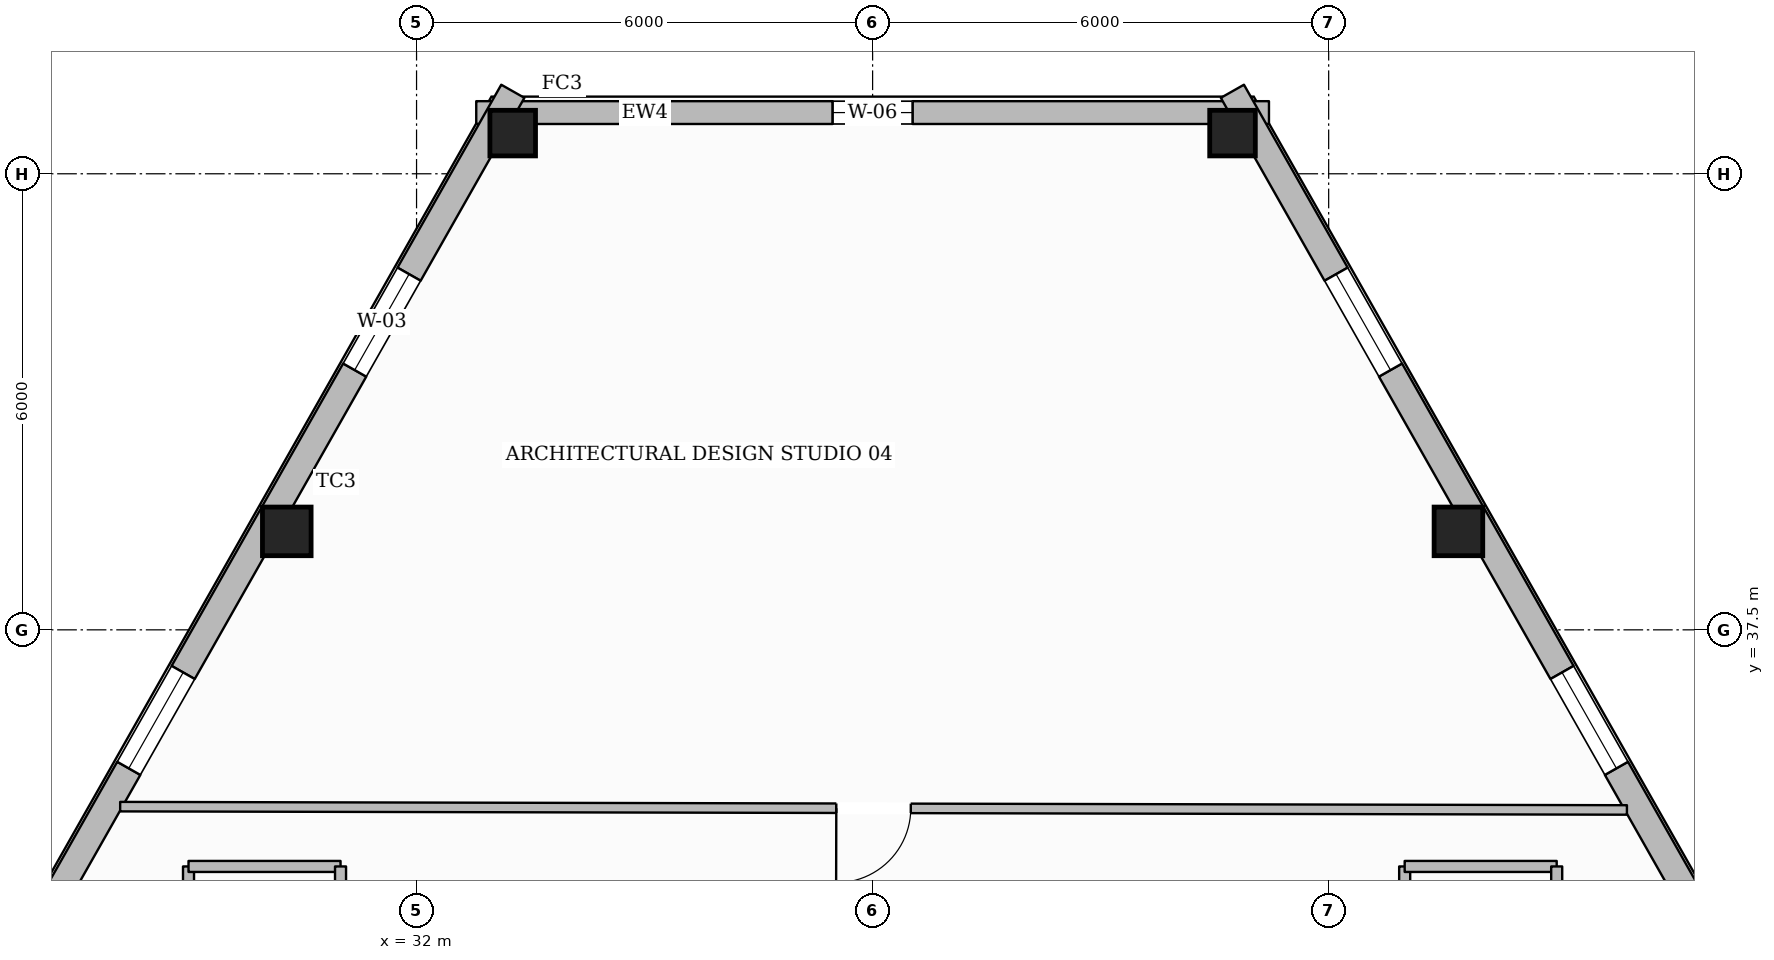
"""IFC4 building model, lengths in metres.
Left out: names, types, materials, properties, quantities, classifications, styles, units other than length and angle.
Written with IfcOpenShell. Run it as: python <this file> out.ifc"""

import sys

from ifc_helpers import new_model, si_unit, direction, frame, frame_2d, origin, origin_2d, place, context, subcontext, project, spatial, rectangle, hollow_rectangle, extrude, element, fill, save


model = new_model("IFC4")
c1 = context("Model", 3, precision=1e-05, world=origin(), true_north=direction((0.0, 1.0)))
c2 = subcontext(c1, "Body", "Model", "MODEL_VIEW")
j1 = project(units=[si_unit("LENGTHUNIT", "METRE"), si_unit("PLANEANGLEUNIT", "RADIAN")], contexts=[c1])
p1 = place(None, origin())
s1 = spatial("IfcSite", under=j1, at=p1, CompositionType="ELEMENT")
p2 = place(p1, origin())
s2 = spatial("IfcBuilding", under=s1, at=p2, CompositionType="ELEMENT")
p3 = place(p2, frame((0.0, 0.0, 165.0)))
s3 = spatial("IfcBuildingStorey", under=s2, at=p3, CompositionType="ELEMENT", Elevation=165.0)
p4 = place(p3, frame((33.265, 44.035, 0.0), z_axis=(0.0, 0.0, 1.0), x_axis=(1.0, 0.0, 0.0)))
e1 = element("IfcColumn", 1, at=p4, inside=s3, PredefinedType="COLUMN", context=c2, shape_type="SweptSolid", body=[
    extrude(hollow_rectangle(XDim=0.6, YDim=0.6, WallThickness=0.028, at=origin_2d()), origin(), (0.0, 0.0, 1.0), 3.6),
])
for number, where, z_axis, x_axis in (
    (2, (30.293, 38.795, 0.0), (0.0, 0.0, 1.0), (1.0, 0.0, 0.0)),
    (3, (45.707, 38.795, 0.0), (0.0, 0.0, 1.0), (1.0, 0.0, 0.0)),
):
    element("IfcColumn", number, at=place(p3, frame(where, z_axis=z_axis, x_axis=x_axis)), inside=s3, PredefinedType="COLUMN", context=c2, shape_type="SweptSolid", body=[
        extrude(hollow_rectangle(XDim=0.64, YDim=0.64, WallThickness=0.028, at=origin_2d()), origin(), (0.0, 0.0, 1.0), 3.6),
    ])
p5 = place(p3, frame((42.735, 44.035, 0.0), z_axis=(0.0, 0.0, 1.0), x_axis=(1.0, 0.0, 0.0)))
e4 = element("IfcColumn", 4, at=p5, inside=s3, PredefinedType="COLUMN", context=c2, shape_type="SweptSolid", body=[
    extrude(hollow_rectangle(XDim=0.6, YDim=0.6, WallThickness=0.028, at=origin_2d()), origin(), (0.0, 0.0, 1.0), 3.6),
])
p6 = place(p3, frame((32.785, 44.305, 0.0), z_axis=(0.0, 0.0, 1.0), x_axis=(1.0, 0.0, 0.0)))
e5 = element("IfcWall", 5, at=p6, inside=s3, PredefinedType="STANDARD", context=c2, shape_type="SweptSolid", body=[
    extrude(rectangle(XDim=10.429, YDim=0.3, at=frame_2d((5.215, 0.0))), origin(), (0.0, 0.0, 1.0), 3.132),
])
p7 = place(p6, frame((4.69, 0.0, 0.65)))
e6 = element("IfcOpeningElement", 6, at=p7, cuts=e5, PredefinedType="OPENING", context=c2, shape_type="SweptSolid", body=[
    extrude(rectangle(XDim=1.05, YDim=1.7, at=frame_2d((0.525, 0.85))), frame((0.0, 0.16, 0.0), z_axis=(0.0, -1.0, 0.0), x_axis=(1.0, 0.0, 0.0)), (0.0, 0.0, 1.0), 0.32),
])
p8 = place(p3, frame((14.964, 12.319, 0.0), z_axis=(0.0, 0.0, 1.0), x_axis=(0.493387150796, 0.869809817966, 0.0)))
e7 = element("IfcWall", 7, at=p8, inside=s3, PredefinedType="STANDARD", context=c2, shape_type="SweptSolid", body=[
    extrude(rectangle(XDim=37.096, YDim=0.35, at=frame_2d((18.548, 0.0))), origin(), (0.0, 0.0, 1.0), 3.132),
])
p9 = place(p8, frame((32.879, 0.0, 0.65)))
e8 = element("IfcOpeningElement", 8, at=p9, cuts=e7, PredefinedType="OPENING", context=c2, shape_type="SweptSolid", body=[
    extrude(rectangle(XDim=1.45, YDim=1.75, at=frame_2d((0.725, 0.875))), frame((0.0, 0.185, 0.0), z_axis=(0.0, -1.0, 0.0), x_axis=(1.0, 0.0, 0.0)), (0.0, 0.0, 1.0), 0.37),
])
p10 = place(p8, frame((26.855, 0.0, 0.65)))
e9 = element("IfcOpeningElement", 9, at=p10, cuts=e7, PredefinedType="OPENING", context=c2, shape_type="SweptSolid", body=[
    extrude(rectangle(XDim=1.45, YDim=1.75, at=frame_2d((0.725, 0.875))), frame((0.0, 0.185, 0.0), z_axis=(0.0, -1.0, 0.0), x_axis=(1.0, 0.0, 0.0)), (0.0, 0.0, 1.0), 0.37),
])
p11 = place(p8, frame((14.807, 0.0, 0.65)))
e10 = element("IfcOpeningElement", 10, at=p11, cuts=e7, PredefinedType="OPENING", context=c2, shape_type="SweptSolid", body=[
    extrude(rectangle(XDim=1.45, YDim=1.75, at=frame_2d((0.725, 0.875))), frame((0.0, 0.185, 0.0), z_axis=(0.0, -1.0, 0.0), x_axis=(1.0, 0.0, 0.0)), (0.0, 0.0, 1.0), 0.37),
])
p12 = place(p8, frame((8.783, 0.0, 0.65)))
e11 = element("IfcOpeningElement", 11, at=p12, cuts=e7, PredefinedType="OPENING", context=c2, shape_type="SweptSolid", body=[
    extrude(rectangle(XDim=1.45, YDim=1.75, at=frame_2d((0.725, 0.875))), frame((0.0, 0.185, 0.0), z_axis=(0.0, -1.0, 0.0), x_axis=(1.0, 0.0, 0.0)), (0.0, 0.0, 1.0), 0.37),
])
p13 = place(p8, frame((2.759, 0.0, 0.65)))
e12 = element("IfcOpeningElement", 12, at=p13, cuts=e7, PredefinedType="OPENING", context=c2, shape_type="SweptSolid", body=[
    extrude(rectangle(XDim=1.45, YDim=1.75, at=frame_2d((0.725, 0.875))), frame((0.0, 0.185, 0.0), z_axis=(0.0, -1.0, 0.0), x_axis=(1.0, 0.0, 0.0)), (0.0, 0.0, 1.0), 0.37),
])
p14 = place(p3, frame((42.733, 44.585, 0.0), z_axis=(0.0, 0.0, 1.0), x_axis=(0.493387150796, -0.869809817966, 0.0)))
e13 = element("IfcWall", 13, at=p14, inside=s3, PredefinedType="STANDARD", context=c2, shape_type="SweptSolid", body=[
    extrude(rectangle(XDim=37.096, YDim=0.35, at=frame_2d((18.548, 0.0))), origin(), (0.0, 0.0, 1.0), 3.132),
])
p15 = place(p14, frame((32.886, 0.0, 0.65)))
e14 = element("IfcOpeningElement", 14, at=p15, cuts=e13, PredefinedType="OPENING", context=c2, shape_type="SweptSolid", body=[
    extrude(rectangle(XDim=1.45, YDim=1.75, at=frame_2d((0.725, 0.875))), frame((0.0, 0.185, 0.0), z_axis=(0.0, -1.0, 0.0), x_axis=(1.0, 0.0, 0.0)), (0.0, 0.0, 1.0), 0.37),
])
p16 = place(p14, frame((26.863, 0.0, 0.65)))
e15 = element("IfcOpeningElement", 15, at=p16, cuts=e13, PredefinedType="OPENING", context=c2, shape_type="SweptSolid", body=[
    extrude(rectangle(XDim=1.45, YDim=1.75, at=frame_2d((0.725, 0.875))), frame((0.0, 0.185, 0.0), z_axis=(0.0, -1.0, 0.0), x_axis=(1.0, 0.0, 0.0)), (0.0, 0.0, 1.0), 0.37),
])
p17 = place(p14, frame((14.814, 0.0, 0.65)))
e16 = element("IfcOpeningElement", 16, at=p17, cuts=e13, PredefinedType="OPENING", context=c2, shape_type="SweptSolid", body=[
    extrude(rectangle(XDim=1.45, YDim=1.75, at=frame_2d((0.725, 0.875))), frame((0.0, 0.185, 0.0), z_axis=(0.0, -1.0, 0.0), x_axis=(1.0, 0.0, 0.0)), (0.0, 0.0, 1.0), 0.37),
])
p18 = place(p14, frame((8.791, 0.0, 0.65)))
e17 = element("IfcOpeningElement", 17, at=p18, cuts=e13, PredefinedType="OPENING", context=c2, shape_type="SweptSolid", body=[
    extrude(rectangle(XDim=1.45, YDim=1.75, at=frame_2d((0.725, 0.875))), frame((0.0, 0.185, 0.0), z_axis=(0.0, -1.0, 0.0), x_axis=(1.0, 0.0, 0.0)), (0.0, 0.0, 1.0), 0.37),
])
p19 = place(p14, frame((2.767, 0.0, 0.65)))
e18 = element("IfcOpeningElement", 18, at=p19, cuts=e13, PredefinedType="OPENING", context=c2, shape_type="SweptSolid", body=[
    extrude(rectangle(XDim=1.45, YDim=1.75, at=frame_2d((0.725, 0.875))), frame((0.0, 0.185, 0.0), z_axis=(0.0, -1.0, 0.0), x_axis=(1.0, 0.0, 0.0)), (0.0, 0.0, 1.0), 0.37),
])
p20 = place(p3, frame((29.0, 25.02, 0.0), z_axis=(0.0, 0.0, 1.0), x_axis=(0.0, 1.0, 0.0)))
e19 = element("IfcWall", 19, at=p20, inside=s3, PredefinedType="PARTITIONING", context=c2, shape_type="SweptSolid", body=[
    extrude(rectangle(XDim=9.367, YDim=0.145, at=frame_2d((4.684, 0.0))), origin(), (0.0, 0.0, 1.0), 3.6),
])
p21 = place(p20, frame((2.496, 0.0, 0.0)))
e20 = element("IfcOpeningElement", 20, at=p21, cuts=e19, PredefinedType="OPENING", context=c2, shape_type="SweptSolid", body=[
    extrude(rectangle(XDim=0.98, YDim=2.15, at=frame_2d((0.49, 1.075))), frame((0.0, 0.083, 0.0), z_axis=(0.0, -1.0, 0.0), x_axis=(1.0, 0.0, 0.0)), (0.0, 0.0, 1.0), 0.165),
])
p22 = place(p3, frame((29.0, 34.387, 0.0), z_axis=(0.0, 0.0, 1.0), x_axis=(1.0, 0.0, 0.0)))
e21 = element("IfcWall", 21, at=p22, inside=s3, PredefinedType="PARTITIONING", context=c2, shape_type="SweptSolid", body=[
    extrude(rectangle(XDim=2.0, YDim=0.145, at=frame_2d((1.0, 0.0))), origin(), (0.0, 0.0, 1.0), 3.6),
])
p23 = place(p3, frame((31.0, 34.387, 0.0), z_axis=(0.0, 0.0, 1.0), x_axis=(0.0, -1.0, 0.0)))
e22 = element("IfcWall", 22, at=p23, inside=s3, PredefinedType="PARTITIONING", context=c2, shape_type="SweptSolid", body=[
    extrude(rectangle(XDim=9.367, YDim=0.145, at=frame_2d((4.684, 0.0))), origin(), (0.0, 0.0, 1.0), 3.6),
])
p24 = place(p23, frame((3.033, 0.0, 0.0)))
e23 = element("IfcOpeningElement", 23, at=p24, cuts=e22, PredefinedType="OPENING", context=c2, shape_type="SweptSolid", body=[
    extrude(rectangle(XDim=1.4, YDim=2.2, at=frame_2d((0.7, 1.1))), frame((0.0, 0.083, 0.0), z_axis=(0.0, -1.0, 0.0), x_axis=(1.0, 0.0, 0.0)), (0.0, 0.0, 1.0), 0.165),
])
p25 = place(p3, frame((45.0, 25.02, 0.0), z_axis=(0.0, 0.0, 1.0), x_axis=(0.0, 1.0, 0.0)))
e24 = element("IfcWall", 24, at=p25, inside=s3, PredefinedType="PARTITIONING", context=c2, shape_type="SweptSolid", body=[
    extrude(rectangle(XDim=9.367, YDim=0.145, at=frame_2d((4.684, 0.0))), origin(), (0.0, 0.0, 1.0), 3.6),
])
p26 = place(p3, frame((45.0, 34.387, 0.0), z_axis=(0.0, 0.0, 1.0), x_axis=(1.0, 0.0, 0.0)))
e25 = element("IfcWall", 25, at=p26, inside=s3, PredefinedType="PARTITIONING", context=c2, shape_type="SweptSolid", body=[
    extrude(rectangle(XDim=2.0, YDim=0.145, at=frame_2d((1.0, 0.0))), origin(), (0.0, 0.0, 1.0), 3.6),
])
p27 = place(p3, frame((47.0, 34.387, 0.0), z_axis=(0.0, 0.0, 1.0), x_axis=(0.0, -1.0, 0.0)))
e26 = element("IfcWall", 26, at=p27, inside=s3, PredefinedType="PARTITIONING", context=c2, shape_type="SweptSolid", body=[
    extrude(rectangle(XDim=9.367, YDim=0.145, at=frame_2d((4.684, 0.0))), origin(), (0.0, 0.0, 1.0), 3.6),
])
p28 = place(p27, frame((6.367, 0.0, 0.0)))
e27 = element("IfcOpeningElement", 27, at=p28, cuts=e26, PredefinedType="OPENING", context=c2, shape_type="SweptSolid", body=[
    extrude(rectangle(XDim=0.98, YDim=2.15, at=frame_2d((0.49, 1.075))), frame((0.0, 0.083, 0.0), z_axis=(0.0, -1.0, 0.0), x_axis=(1.0, 0.0, 0.0)), (0.0, 0.0, 1.0), 0.165),
])
p29 = place(p3, frame((47.924, 35.13, 0.0), z_axis=(0.0, 0.0, 1.0), x_axis=(-0.999997570066, 0.002204509588, 0.0)))
e28 = element("IfcWall", 28, at=p29, inside=s3, PredefinedType="PARTITIONING", context=c2, shape_type="SweptSolid", body=[
    extrude(rectangle(XDim=19.823, YDim=0.125, at=frame_2d((9.912, 0.0))), origin(), (0.0, 0.0, 1.0), 3.6),
])
p30 = place(p29, frame((9.422, 0.0, 0.0)))
e29 = element("IfcOpeningElement", 29, at=p30, cuts=e28, PredefinedType="OPENING", context=c2, shape_type="SweptSolid", body=[
    extrude(rectangle(XDim=0.98, YDim=2.15, at=frame_2d((0.49, 1.075))), frame((0.0, 0.073, 0.0), z_axis=(0.0, -1.0, 0.0), x_axis=(1.0, 0.0, 0.0)), (0.0, 0.0, 1.0), 0.145),
])
p31 = place(p9, origin())
e30 = element("IfcWindow", 30, at=p31, inside=s3, PartitioningType="SINGLE_PANEL", PredefinedType="WINDOW", context=c2, shape_type="SweptSolid", body=[
    extrude(rectangle(XDim=1.45, YDim=1.75, at=frame_2d((0.725, 0.875))), frame((0.0, 0.03, 0.0), z_axis=(0.0, -1.0, 0.0), x_axis=(1.0, 0.0, 0.0)), (0.0, 0.0, 1.0), 0.06),
])
fill(e8, e30)
p32 = place(p10, origin())
e31 = element("IfcWindow", 31, at=p32, inside=s3, PartitioningType="SINGLE_PANEL", PredefinedType="WINDOW", context=c2, shape_type="SweptSolid", body=[
    extrude(rectangle(XDim=1.45, YDim=1.75, at=frame_2d((0.725, 0.875))), frame((0.0, 0.03, 0.0), z_axis=(0.0, -1.0, 0.0), x_axis=(1.0, 0.0, 0.0)), (0.0, 0.0, 1.0), 0.06),
])
fill(e9, e31)
p33 = place(p18, origin())
e32 = element("IfcWindow", 32, at=p33, inside=s3, PartitioningType="SINGLE_PANEL", PredefinedType="WINDOW", context=c2, shape_type="SweptSolid", body=[
    extrude(rectangle(XDim=1.45, YDim=1.75, at=frame_2d((0.725, 0.875))), frame((0.0, 0.03, 0.0), z_axis=(0.0, -1.0, 0.0), x_axis=(1.0, 0.0, 0.0)), (0.0, 0.0, 1.0), 0.06),
])
fill(e17, e32)
p34 = place(p19, origin())
e33 = element("IfcWindow", 33, at=p34, inside=s3, PartitioningType="SINGLE_PANEL", PredefinedType="WINDOW", context=c2, shape_type="SweptSolid", body=[
    extrude(rectangle(XDim=1.45, YDim=1.75, at=frame_2d((0.725, 0.875))), frame((0.0, 0.03, 0.0), z_axis=(0.0, -1.0, 0.0), x_axis=(1.0, 0.0, 0.0)), (0.0, 0.0, 1.0), 0.06),
])
fill(e18, e33)
p35 = place(p7, origin())
e34 = element("IfcWindow", 34, at=p35, inside=s3, PartitioningType="SINGLE_PANEL", PredefinedType="WINDOW", context=c2, shape_type="SweptSolid", body=[
    extrude(rectangle(XDim=1.05, YDim=1.7, at=frame_2d((0.525, 0.85))), frame((0.0, 0.03, 0.0), z_axis=(0.0, -1.0, 0.0), x_axis=(1.0, 0.0, 0.0)), (0.0, 0.0, 1.0), 0.06),
])
fill(e6, e34)
p36 = place(p30, origin())
e35 = element("IfcDoor", 35, at=p36, inside=s3, OperationType="SINGLE_SWING_RIGHT", PredefinedType="DOOR", context=c2, shape_type="SweptSolid", body=[
    extrude(rectangle(XDim=0.98, YDim=2.15, at=frame_2d((0.49, 1.075))), frame((0.0, 0.025, 0.0), z_axis=(0.0, -1.0, 0.0), x_axis=(1.0, 0.0, 0.0)), (0.0, 0.0, 1.0), 0.05),
])
fill(e29, e35)
save(model, sys.argv[1])
